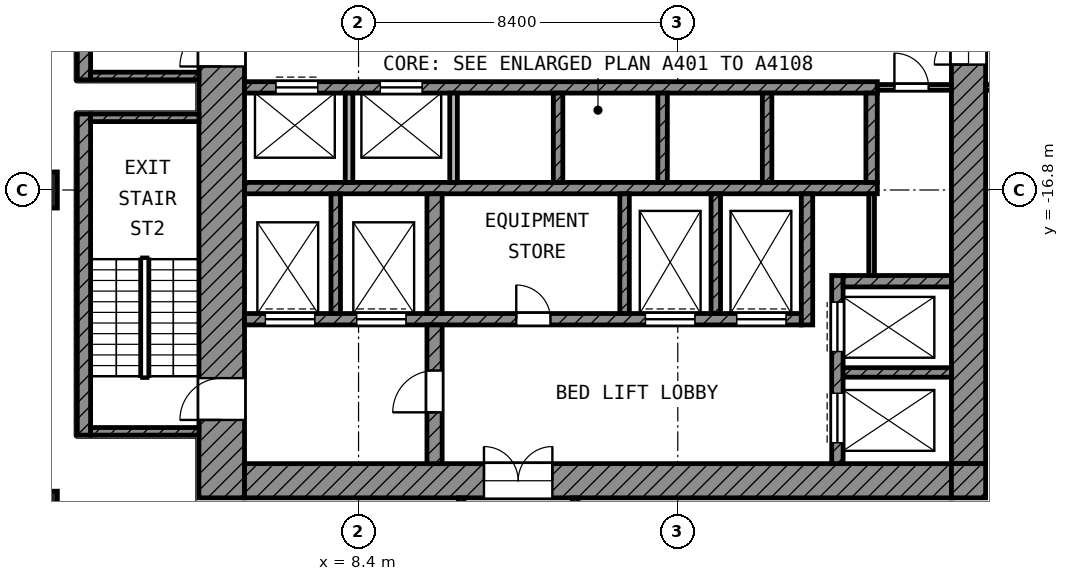
"""IFC4 building model, lengths in metres.
Left out: names, types, materials, properties, quantities, classifications, styles, units other than length and angle.
Written with IfcOpenShell. Run it as: python <this file> out.ifc"""

import sys

from ifc_helpers import new_model, si_unit, direction, frame, frame_2d, origin, origin_2d, place, context, subcontext, project, spatial, rectangle, extrude, element, fill, save


model = new_model("IFC4")
c1 = context("Model", 3, precision=1e-05, world=origin(), true_north=direction((0.0, 1.0)))
c2 = subcontext(c1, "Body", "Model", "MODEL_VIEW")
j1 = project(units=[si_unit("LENGTHUNIT", "METRE"), si_unit("PLANEANGLEUNIT", "RADIAN")], contexts=[c1])
p1 = place(None, origin())
s1 = spatial("IfcSite", under=j1, at=p1, CompositionType="ELEMENT")
p2 = place(p1, origin())
s2 = spatial("IfcBuilding", under=s1, at=p2, CompositionType="ELEMENT")
p3 = place(p2, frame((0.0, 0.0, 187.8)))
s3 = spatial("IfcBuildingStorey", under=s2, at=p3, CompositionType="ELEMENT", Elevation=187.8)
for number, where, z_axis, x_axis in (
    (1, (0.0, -16.8, 0.0), (0.0, 0.0, 1.0), (1.0, 0.0, 0.0)),
    (2, (0.0, -25.2, 0.0), (0.0, 0.0, 1.0), (1.0, 0.0, 0.0)),
):
    element("IfcColumn", number, at=place(p3, frame(where, z_axis=z_axis, x_axis=x_axis)), inside=s3, PredefinedType="COLUMN", context=c2, shape_type="SweptSolid", body=[
        extrude(rectangle(XDim=0.95, YDim=0.95, at=origin_2d()), origin(), (0.0, 0.0, 1.0), 4.2),
    ])
p4 = place(p3, frame((4.8, -24.9, 0.0), z_axis=(0.0, 0.0, 1.0), x_axis=(0.0, 1.0, 0.0)))
e3 = element("IfcWall", 3, at=p4, inside=s3, PredefinedType="SHEAR", context=c2, shape_type="SweptSolid", body=[
    extrude(rectangle(XDim=19.5, YDim=1.2, at=frame_2d((9.75, 0.0))), origin(), (0.0, 0.0, 1.0), 3.6),
])
p5 = place(p4, frame((11.35, 0.0, 0.0)))
e4 = element("IfcOpeningElement", 4, at=p5, cuts=e3, PredefinedType="OPENING", context=c2, shape_type="SweptSolid", body=[
    extrude(rectangle(XDim=1.1, YDim=2.1, at=frame_2d((0.55, 1.05))), frame((0.0, 0.61, 0.0), z_axis=(0.0, -1.0, 0.0), x_axis=(1.0, 0.0, 0.0)), (0.0, 0.0, 1.0), 1.22),
])
p6 = place(p4, frame((2.05, 0.0, 0.0)))
e5 = element("IfcOpeningElement", 5, at=p6, cuts=e3, PredefinedType="OPENING", context=c2, shape_type="SweptSolid", body=[
    extrude(rectangle(XDim=1.1, YDim=2.1, at=frame_2d((0.55, 1.05))), frame((0.0, 0.61, 0.0), z_axis=(0.0, -1.0, 0.0), x_axis=(1.0, 0.0, 0.0)), (0.0, 0.0, 1.0), 1.22),
])
p7 = place(p3, frame((24.45, -24.0, 0.0), z_axis=(0.0, 0.0, 1.0), x_axis=(0.0, 1.0, 0.0)))
e6 = element("IfcWall", 6, at=p7, inside=s3, PredefinedType="SHEAR", context=c2, shape_type="SweptSolid", body=[
    extrude(rectangle(XDim=18.6, YDim=0.9, at=frame_2d((9.3, 0.0))), origin(), (0.0, 0.0, 1.0), 3.6),
])
p8 = place(p7, frame((10.5, 0.0, 0.0)))
e7 = element("IfcOpeningElement", 7, at=p8, cuts=e6, PredefinedType="OPENING", context=c2, shape_type="SweptSolid", body=[
    extrude(rectangle(XDim=1.8, YDim=2.1, at=frame_2d((0.9, 1.05))), frame((0.0, 0.46, 0.0), z_axis=(0.0, -1.0, 0.0), x_axis=(1.0, 0.0, 0.0)), (0.0, 0.0, 1.0), 0.92),
])
p9 = place(p3, frame((5.4, -24.45, 0.0), z_axis=(0.0, 0.0, 1.0), x_axis=(1.0, 0.0, 0.0)))
e8 = element("IfcWall", 8, at=p9, inside=s3, PredefinedType="SHEAR", context=c2, shape_type="SweptSolid", body=[
    extrude(rectangle(XDim=18.6, YDim=0.9, at=frame_2d((9.3, 0.0))), origin(), (0.0, 0.0, 1.0), 3.6),
])
p10 = place(p9, frame((6.3, 0.0, 0.0)))
e9 = element("IfcOpeningElement", 9, at=p10, cuts=e8, PredefinedType="OPENING", context=c2, shape_type="SweptSolid", body=[
    extrude(rectangle(XDim=1.8, YDim=2.1, at=frame_2d((0.9, 1.05))), frame((0.0, 0.46, 0.0), z_axis=(0.0, -1.0, 0.0), x_axis=(1.0, 0.0, 0.0)), (0.0, 0.0, 1.0), 0.92),
])
p11 = place(p3, frame((24.45, -24.9, 0.0), z_axis=(0.0, 0.0, 1.0), x_axis=(0.0, 1.0, 0.0)))
e10 = element("IfcWall", 10, at=p11, inside=s3, PredefinedType="SHEAR", context=c2, shape_type="SweptSolid", body=[
    extrude(rectangle(XDim=0.9, YDim=0.9, at=frame_2d((0.45, 0.0))), origin(), (0.0, 0.0, 1.0), 3.6),
])
p12 = place(p3, frame((5.4, -14.1, 0.0), z_axis=(0.0, 0.0, 1.0), x_axis=(1.0, 0.0, 0.0)))
e11 = element("IfcWall", 11, at=p12, inside=s3, PredefinedType="SHEAR", context=c2, shape_type="SweptSolid", body=[
    extrude(rectangle(XDim=16.65, YDim=0.3, at=frame_2d((8.325, 0.0))), origin(), (0.0, 0.0, 1.0), 3.6),
])
p13 = place(p12, frame((0.825, 0.0, 0.0)))
e12 = element("IfcOpeningElement", 12, at=p13, cuts=e11, PredefinedType="OPENING", context=c2, shape_type="SweptSolid", body=[
    extrude(rectangle(XDim=1.1, YDim=2.1, at=frame_2d((0.55, 1.05))), frame((0.0, 0.16, 0.0), z_axis=(0.0, -1.0, 0.0), x_axis=(1.0, 0.0, 0.0)), (0.0, 0.0, 1.0), 0.32),
])
p14 = place(p12, frame((3.575, 0.0, 0.0)))
e13 = element("IfcOpeningElement", 13, at=p14, cuts=e11, PredefinedType="OPENING", context=c2, shape_type="SweptSolid", body=[
    extrude(rectangle(XDim=1.1, YDim=2.1, at=frame_2d((0.55, 1.05))), frame((0.0, 0.16, 0.0), z_axis=(0.0, -1.0, 0.0), x_axis=(1.0, 0.0, 0.0)), (0.0, 0.0, 1.0), 0.32),
])
p15 = place(p3, frame((5.4, -16.75, 0.0), z_axis=(0.0, 0.0, 1.0), x_axis=(1.0, 0.0, 0.0)))
e14 = element("IfcWall", 14, at=p15, inside=s3, PredefinedType="SHEAR", context=c2, shape_type="SweptSolid", body=[
    extrude(rectangle(XDim=16.65, YDim=0.3, at=frame_2d((8.325, 0.0))), origin(), (0.0, 0.0, 1.0), 3.6),
])
p16 = place(p3, frame((5.4, -20.2, 0.0), z_axis=(0.0, 0.0, 1.0), x_axis=(1.0, 0.0, 0.0)))
e15 = element("IfcWall", 15, at=p16, inside=s3, PredefinedType="SHEAR", context=c2, shape_type="SweptSolid", body=[
    extrude(rectangle(XDim=14.65, YDim=0.3, at=frame_2d((7.325, 0.0))), origin(), (0.0, 0.0, 1.0), 3.6),
])
p17 = place(p16, frame((10.55, 0.0, 0.0)))
e16 = element("IfcOpeningElement", 16, at=p17, cuts=e15, PredefinedType="OPENING", context=c2, shape_type="SweptSolid", body=[
    extrude(rectangle(XDim=1.3, YDim=2.1, at=frame_2d((0.65, 1.05))), frame((0.0, 0.16, 0.0), z_axis=(0.0, -1.0, 0.0), x_axis=(1.0, 0.0, 0.0)), (0.0, 0.0, 1.0), 0.32),
])
p18 = place(p16, frame((12.95, 0.0, 0.0)))
e17 = element("IfcOpeningElement", 17, at=p18, cuts=e15, PredefinedType="OPENING", context=c2, shape_type="SweptSolid", body=[
    extrude(rectangle(XDim=1.3, YDim=2.1, at=frame_2d((0.65, 1.05))), frame((0.0, 0.16, 0.0), z_axis=(0.0, -1.0, 0.0), x_axis=(1.0, 0.0, 0.0)), (0.0, 0.0, 1.0), 0.32),
])
p19 = place(p16, frame((0.55, 0.0, 0.0)))
e18 = element("IfcOpeningElement", 18, at=p19, cuts=e15, PredefinedType="OPENING", context=c2, shape_type="SweptSolid", body=[
    extrude(rectangle(XDim=1.3, YDim=2.1, at=frame_2d((0.65, 1.05))), frame((0.0, 0.16, 0.0), z_axis=(0.0, -1.0, 0.0), x_axis=(1.0, 0.0, 0.0)), (0.0, 0.0, 1.0), 0.32),
])
p20 = place(p16, frame((2.95, 0.0, 0.0)))
e19 = element("IfcOpeningElement", 19, at=p20, cuts=e15, PredefinedType="OPENING", context=c2, shape_type="SweptSolid", body=[
    extrude(rectangle(XDim=1.3, YDim=2.1, at=frame_2d((0.65, 1.05))), frame((0.0, 0.16, 0.0), z_axis=(0.0, -1.0, 0.0), x_axis=(1.0, 0.0, 0.0)), (0.0, 0.0, 1.0), 0.32),
])
p21 = place(p16, frame((7.15, 0.0, 0.0)))
e20 = element("IfcOpeningElement", 20, at=p21, cuts=e15, PredefinedType="OPENING", context=c2, shape_type="SweptSolid", body=[
    extrude(rectangle(XDim=0.9, YDim=2.1, at=frame_2d((0.45, 1.05))), frame((0.0, 0.16, 0.0), z_axis=(0.0, -1.0, 0.0), x_axis=(1.0, 0.0, 0.0)), (0.0, 0.0, 1.0), 0.32),
])
p22 = place(p3, frame((10.4, -24.0, 0.0), z_axis=(0.0, 0.0, 1.0), x_axis=(0.0, 1.0, 0.0)))
e21 = element("IfcWall", 21, at=p22, inside=s3, PredefinedType="SHEAR", context=c2, shape_type="SweptSolid", body=[
    extrude(rectangle(XDim=3.65, YDim=0.4, at=frame_2d((1.825, 0.0))), origin(), (0.0, 0.0, 1.0), 3.6),
])
p23 = place(p22, frame((1.35, 0.0, 0.0)))
e22 = element("IfcOpeningElement", 22, at=p23, cuts=e21, PredefinedType="OPENING", context=c2, shape_type="SweptSolid", body=[
    extrude(rectangle(XDim=1.1, YDim=2.1, at=frame_2d((0.55, 1.05))), frame((0.0, 0.21, 0.0), z_axis=(0.0, -1.0, 0.0), x_axis=(1.0, 0.0, 0.0)), (0.0, 0.0, 1.0), 0.42),
])
p24 = place(p3, frame((10.4, -20.05, 0.0), z_axis=(0.0, 0.0, 1.0), x_axis=(0.0, 1.0, 0.0)))
e23 = element("IfcWall", 23, at=p24, inside=s3, PredefinedType="SHEAR", context=c2, shape_type="SweptSolid", body=[
    extrude(rectangle(XDim=3.15, YDim=0.4, at=frame_2d((1.575, 0.0))), origin(), (0.0, 0.0, 1.0), 3.6),
])
p25 = place(p3, frame((20.2, -20.35, 0.0), z_axis=(0.0, 0.0, 1.0), x_axis=(0.0, 1.0, 0.0)))
e24 = element("IfcWall", 24, at=p25, inside=s3, PredefinedType="SHEAR", context=c2, shape_type="SweptSolid", body=[
    extrude(rectangle(XDim=3.45, YDim=0.3, at=frame_2d((1.725, 0.0))), origin(), (0.0, 0.0, 1.0), 3.6),
])
p26 = place(p3, frame((21.9, -16.6, 0.0), z_axis=(0.0, 0.0, 1.0), x_axis=(0.0, 1.0, 0.0)))
e25 = element("IfcWall", 25, at=p26, inside=s3, PredefinedType="SHEAR", context=c2, shape_type="SweptSolid", body=[
    extrude(rectangle(XDim=2.35, YDim=0.3, at=frame_2d((1.175, 0.0))), origin(), (0.0, 0.0, 1.0), 3.6),
])
p27 = place(p3, frame((21.15, -19.2, 0.0), z_axis=(0.0, 0.0, 1.0), x_axis=(1.0, 0.0, 0.0)))
e26 = element("IfcWall", 26, at=p27, inside=s3, PredefinedType="SHEAR", context=c2, shape_type="SweptSolid", body=[
    extrude(rectangle(XDim=2.85, YDim=0.3, at=frame_2d((1.425, 0.0))), origin(), (0.0, 0.0, 1.0), 3.6),
])
p28 = place(p3, frame((21.0, -24.0, 0.0), z_axis=(0.0, 0.0, 1.0), x_axis=(0.0, 1.0, 0.0)))
e27 = element("IfcWall", 27, at=p28, inside=s3, PredefinedType="SHEAR", context=c2, shape_type="SweptSolid", body=[
    extrude(rectangle(XDim=4.95, YDim=0.3, at=frame_2d((2.475, 0.0))), origin(), (0.0, 0.0, 1.0), 3.6),
])
p29 = place(p28, frame((2.95, 0.0, 0.0)))
e28 = element("IfcOpeningElement", 28, at=p29, cuts=e27, PredefinedType="OPENING", context=c2, shape_type="SweptSolid", body=[
    extrude(rectangle(XDim=1.3, YDim=2.1, at=frame_2d((0.65, 1.05))), frame((0.0, 0.16, 0.0), z_axis=(0.0, -1.0, 0.0), x_axis=(1.0, 0.0, 0.0)), (0.0, 0.0, 1.0), 0.32),
])
p30 = place(p28, frame((0.55, 0.0, 0.0)))
e29 = element("IfcOpeningElement", 29, at=p30, cuts=e27, PredefinedType="OPENING", context=c2, shape_type="SweptSolid", body=[
    extrude(rectangle(XDim=1.3, YDim=2.1, at=frame_2d((0.65, 1.05))), frame((0.0, 0.16, 0.0), z_axis=(0.0, -1.0, 0.0), x_axis=(1.0, 0.0, 0.0)), (0.0, 0.0, 1.0), 0.32),
])
p31 = place(p3, frame((21.15, -21.6, 0.0), z_axis=(0.0, 0.0, 1.0), x_axis=(1.0, 0.0, 0.0)))
e30 = element("IfcWall", 30, at=p31, inside=s3, PredefinedType="SHEAR", context=c2, shape_type="SweptSolid", body=[
    extrude(rectangle(XDim=2.85, YDim=0.25, at=frame_2d((1.425, 0.0))), origin(), (0.0, 0.0, 1.0), 3.6),
])
for number, where, z_axis, x_axis in (
    (31, (7.8, -20.05, 0.0), (0.0, 0.0, 1.0), (0.0, 1.0, 0.0)),
    (32, (15.4, -20.05, 0.0), (0.0, 0.0, 1.0), (0.0, 1.0, 0.0)),
    (33, (17.8, -20.05, 0.0), (0.0, 0.0, 1.0), (0.0, 1.0, 0.0)),
):
    element("IfcWall", number, at=place(p3, frame(where, z_axis=z_axis, x_axis=x_axis)), inside=s3, PredefinedType="SHEAR", context=c2, shape_type="SweptSolid", body=[
        extrude(rectangle(XDim=3.15, YDim=0.25, at=frame_2d((1.575, 0.0))), origin(), (0.0, 0.0, 1.0), 3.6),
    ])
for number, where, z_axis, x_axis in (
    (34, (8.15, -16.6, 0.0), (0.0, 0.0, 1.0), (0.0, 1.0, 0.0)),
    (35, (10.9, -16.6, 0.0), (0.0, 0.0, 1.0), (0.0, 1.0, 0.0)),
):
    element("IfcWall", number, at=place(p3, frame(where, z_axis=z_axis, x_axis=x_axis)), inside=s3, PredefinedType="PARTITIONING", context=c2, shape_type="SweptSolid", body=[
        extrude(rectangle(XDim=2.35, YDim=0.2, at=frame_2d((1.175, 0.0))), origin(), (0.0, 0.0, 1.0), 3.6),
    ])
for number, where, z_axis, x_axis in (
    (36, (13.65, -16.6, 0.0), (0.0, 0.0, 1.0), (0.0, 1.0, 0.0)),
    (37, (16.4, -16.6, 0.0), (0.0, 0.0, 1.0), (0.0, 1.0, 0.0)),
    (38, (19.15, -16.6, 0.0), (0.0, 0.0, 1.0), (0.0, 1.0, 0.0)),
):
    element("IfcWall", number, at=place(p3, frame(where, z_axis=z_axis, x_axis=x_axis)), inside=s3, PredefinedType="SHEAR", context=c2, shape_type="SweptSolid", body=[
        extrude(rectangle(XDim=2.35, YDim=0.25, at=frame_2d((1.175, 0.0))), origin(), (0.0, 0.0, 1.0), 3.6),
    ])
p32 = place(p3, frame((21.9, -19.05, 0.0), z_axis=(0.0, 0.0, 1.0), x_axis=(0.0, 1.0, 0.0)))
e39 = element("IfcWall", 39, at=p32, inside=s3, PredefinedType="PARTITIONING", context=c2, shape_type="SweptSolid", body=[
    extrude(rectangle(XDim=2.15, YDim=0.15, at=frame_2d((1.075, 0.0))), origin(), (0.0, 0.0, 1.0), 3.6),
])
p33 = place(p3, frame((22.05, -14.1, 0.0), z_axis=(0.0, 0.0, 1.0), x_axis=(1.0, 0.0, 0.0)))
e40 = element("IfcWall", 40, at=p33, inside=s3, PredefinedType="PARTITIONING", context=c2, shape_type="SweptSolid", body=[
    extrude(rectangle(XDim=1.95, YDim=0.15, at=frame_2d((0.975, 0.0))), origin(), (0.0, 0.0, 1.0), 3.6),
])
p34 = place(p33, frame((0.45, 0.0, 0.0)))
e41 = element("IfcOpeningElement", 41, at=p34, cuts=e40, PredefinedType="OPENING", context=c2, shape_type="SweptSolid", body=[
    extrude(rectangle(XDim=0.9, YDim=2.1, at=frame_2d((0.45, 1.05))), frame((0.0, 0.085, 0.0), z_axis=(0.0, -1.0, 0.0), x_axis=(1.0, 0.0, 0.0)), (0.0, 0.0, 1.0), 0.17),
])
p35 = place(p3, frame((1.175, -13.9, 0.0), z_axis=(0.0, 0.0, 1.0), x_axis=(0.0, 1.0, 0.0)))
e42 = element("IfcWall", 42, at=p35, inside=s3, PredefinedType="SHEAR", context=c2, shape_type="SweptSolid", body=[
    extrude(rectangle(XDim=8.45, YDim=0.35, at=frame_2d((4.225, 0.0))), origin(), (0.0, 0.0, 1.0), 3.6),
])
p36 = place(p3, frame((1.35, -13.8, 0.0), z_axis=(0.0, 0.0, 1.0), x_axis=(1.0, 0.0, 0.0)))
e43 = element("IfcWall", 43, at=p36, inside=s3, PredefinedType="SHEAR", context=c2, shape_type="SweptSolid", body=[
    extrude(rectangle(XDim=2.85, YDim=0.2, at=frame_2d((1.425, 0.0))), origin(), (0.0, 0.0, 1.0), 3.6),
])
p37 = place(p3, frame((1.175, -23.25, 0.0), z_axis=(0.0, 0.0, 1.0), x_axis=(0.0, 1.0, 0.0)))
e44 = element("IfcWall", 44, at=p37, inside=s3, PredefinedType="SHEAR", context=c2, shape_type="SweptSolid", body=[
    extrude(rectangle(XDim=8.45, YDim=0.35, at=frame_2d((4.225, 0.0))), origin(), (0.0, 0.0, 1.0), 3.6),
])
for number, where, z_axis, x_axis in (
    (45, (1.35, -14.9, 0.0), (0.0, 0.0, 1.0), (1.0, 0.0, 0.0)),
    (46, (1.35, -23.15, 0.0), (0.0, 0.0, 1.0), (1.0, 0.0, 0.0)),
):
    element("IfcWall", number, at=place(p3, frame(where, z_axis=z_axis, x_axis=x_axis)), inside=s3, PredefinedType="SHEAR", context=c2, shape_type="SweptSolid", body=[
        extrude(rectangle(XDim=2.85, YDim=0.2, at=frame_2d((1.425, 0.0))), origin(), (0.0, 0.0, 1.0), 3.6),
    ])
p38 = place(p3, frame((24.9, -14.1, 0.0), z_axis=(0.0, 0.0, 1.0), x_axis=(1.0, 0.0, 0.0)))
e47 = element("IfcWall", 47, at=p38, inside=s3, PredefinedType="PARTITIONING", context=c2, shape_type="SweptSolid", body=[
    extrude(rectangle(XDim=4.425, YDim=0.15, at=frame_2d((2.212, 0.0))), origin(), (0.0, 0.0, 1.0), 3.6),
])
p39 = place(p38, frame((1.65, 0.0, 0.0)))
e48 = element("IfcOpeningElement", 48, at=p39, cuts=e47, PredefinedType="OPENING", context=c2, shape_type="SweptSolid", body=[
    extrude(rectangle(XDim=1.5, YDim=2.1, at=frame_2d((0.75, 1.05))), frame((0.0, 0.085, 0.0), z_axis=(0.0, -1.0, 0.0), x_axis=(1.0, 0.0, 0.0)), (0.0, 0.0, 1.0), 0.17),
])
p40 = place(p3, frame((11.1, -29.397, 0.0), z_axis=(0.0, 0.0, 1.0), x_axis=(0.0, 1.0, 0.0)))
e49 = element("IfcWall", 49, at=p40, inside=s3, PredefinedType="PARTITIONING", context=c2, shape_type="SweptSolid", body=[
    extrude(rectangle(XDim=4.497, YDim=0.15, at=frame_2d((2.249, 0.0))), origin(), (0.0, 0.0, 1.0), 3.6),
])
p41 = place(p3, frame((14.1, -29.4, 0.0), z_axis=(0.0, 0.0, 1.0), x_axis=(0.0, 1.0, 0.0)))
e50 = element("IfcWall", 50, at=p41, inside=s3, PredefinedType="PARTITIONING", context=c2, shape_type="SweptSolid", body=[
    extrude(rectangle(XDim=4.5, YDim=0.15, at=frame_2d((2.25, 0.0))), origin(), (0.0, 0.0, 1.0), 3.6),
])
p42 = place(p13, origin())
e51 = element("IfcDoor", 51, at=p42, inside=s3, OperationType="DOUBLE_DOOR_SLIDING", PredefinedType="DOOR", context=c2, shape_type="SweptSolid", body=[
    extrude(rectangle(XDim=1.1, YDim=2.1, at=frame_2d((0.55, 1.05))), frame((0.0, 0.025, 0.0), z_axis=(0.0, -1.0, 0.0), x_axis=(1.0, 0.0, 0.0)), (0.0, 0.0, 1.0), 0.05),
])
fill(e12, e51)
p43 = place(p14, origin())
e52 = element("IfcDoor", 52, at=p43, inside=s3, OperationType="DOUBLE_DOOR_SLIDING", PredefinedType="DOOR", context=c2, shape_type="SweptSolid", body=[
    extrude(rectangle(XDim=1.1, YDim=2.1, at=frame_2d((0.55, 1.05))), frame((0.0, 0.025, 0.0), z_axis=(0.0, -1.0, 0.0), x_axis=(1.0, 0.0, 0.0)), (0.0, 0.0, 1.0), 0.05),
])
fill(e13, e52)
p44 = place(p29, origin())
e53 = element("IfcDoor", 53, at=p44, inside=s3, OperationType="DOUBLE_DOOR_SLIDING", PredefinedType="DOOR", context=c2, shape_type="SweptSolid", body=[
    extrude(rectangle(XDim=1.3, YDim=2.1, at=frame_2d((0.65, 1.05))), frame((0.0, 0.025, 0.0), z_axis=(0.0, -1.0, 0.0), x_axis=(1.0, 0.0, 0.0)), (0.0, 0.0, 1.0), 0.05),
])
fill(e28, e53)
p45 = place(p30, origin())
e54 = element("IfcDoor", 54, at=p45, inside=s3, OperationType="DOUBLE_DOOR_SLIDING", PredefinedType="DOOR", context=c2, shape_type="SweptSolid", body=[
    extrude(rectangle(XDim=1.3, YDim=2.1, at=frame_2d((0.65, 1.05))), frame((0.0, 0.025, 0.0), z_axis=(0.0, -1.0, 0.0), x_axis=(1.0, 0.0, 0.0)), (0.0, 0.0, 1.0), 0.05),
])
fill(e29, e54)
p46 = place(p17, origin())
e55 = element("IfcDoor", 55, at=p46, inside=s3, OperationType="DOUBLE_DOOR_SLIDING", PredefinedType="DOOR", context=c2, shape_type="SweptSolid", body=[
    extrude(rectangle(XDim=1.3, YDim=2.1, at=frame_2d((0.65, 1.05))), frame((0.0, 0.025, 0.0), z_axis=(0.0, -1.0, 0.0), x_axis=(1.0, 0.0, 0.0)), (0.0, 0.0, 1.0), 0.05),
])
fill(e16, e55)
p47 = place(p18, origin())
e56 = element("IfcDoor", 56, at=p47, inside=s3, OperationType="DOUBLE_DOOR_SLIDING", PredefinedType="DOOR", context=c2, shape_type="SweptSolid", body=[
    extrude(rectangle(XDim=1.3, YDim=2.1, at=frame_2d((0.65, 1.05))), frame((0.0, 0.025, 0.0), z_axis=(0.0, -1.0, 0.0), x_axis=(1.0, 0.0, 0.0)), (0.0, 0.0, 1.0), 0.05),
])
fill(e17, e56)
p48 = place(p19, origin())
e57 = element("IfcDoor", 57, at=p48, inside=s3, OperationType="DOUBLE_DOOR_SLIDING", PredefinedType="DOOR", context=c2, shape_type="SweptSolid", body=[
    extrude(rectangle(XDim=1.3, YDim=2.1, at=frame_2d((0.65, 1.05))), frame((0.0, 0.025, 0.0), z_axis=(0.0, -1.0, 0.0), x_axis=(1.0, 0.0, 0.0)), (0.0, 0.0, 1.0), 0.05),
])
fill(e18, e57)
p49 = place(p20, origin())
e58 = element("IfcDoor", 58, at=p49, inside=s3, OperationType="DOUBLE_DOOR_SLIDING", PredefinedType="DOOR", context=c2, shape_type="SweptSolid", body=[
    extrude(rectangle(XDim=1.3, YDim=2.1, at=frame_2d((0.65, 1.05))), frame((0.0, 0.025, 0.0), z_axis=(0.0, -1.0, 0.0), x_axis=(1.0, 0.0, 0.0)), (0.0, 0.0, 1.0), 0.05),
])
fill(e19, e58)
p50 = place(p5, origin())
e59 = element("IfcDoor", 59, at=p50, inside=s3, OperationType="SINGLE_SWING_LEFT", PredefinedType="DOOR", context=c2, shape_type="SweptSolid", body=[
    extrude(rectangle(XDim=1.1, YDim=2.1, at=frame_2d((0.55, 1.05))), frame((0.0, 0.025, 0.0), z_axis=(0.0, -1.0, 0.0), x_axis=(1.0, 0.0, 0.0)), (0.0, 0.0, 1.0), 0.05),
])
fill(e4, e59)
p51 = place(p6, origin())
e60 = element("IfcDoor", 60, at=p51, inside=s3, OperationType="SINGLE_SWING_LEFT", PredefinedType="DOOR", context=c2, shape_type="SweptSolid", body=[
    extrude(rectangle(XDim=1.1, YDim=2.1, at=frame_2d((0.55, 1.05))), frame((0.0, 0.025, 0.0), z_axis=(0.0, -1.0, 0.0), x_axis=(1.0, 0.0, 0.0)), (0.0, 0.0, 1.0), 0.05),
])
fill(e5, e60)
p52 = place(p23, origin())
e61 = element("IfcDoor", 61, at=p52, inside=s3, OperationType="SINGLE_SWING_LEFT", PredefinedType="DOOR", context=c2, shape_type="SweptSolid", body=[
    extrude(rectangle(XDim=1.1, YDim=2.1, at=frame_2d((0.55, 1.05))), frame((0.0, 0.025, 0.0), z_axis=(0.0, -1.0, 0.0), x_axis=(1.0, 0.0, 0.0)), (0.0, 0.0, 1.0), 0.05),
])
fill(e22, e61)
p53 = place(p8, origin())
e62 = element("IfcDoor", 62, at=p53, inside=s3, OperationType="DOUBLE_DOOR_SINGLE_SWING", PredefinedType="DOOR", context=c2, shape_type="SweptSolid", body=[
    extrude(rectangle(XDim=1.8, YDim=2.1, at=frame_2d((0.9, 1.05))), frame((0.0, 0.025, 0.0), z_axis=(0.0, -1.0, 0.0), x_axis=(1.0, 0.0, 0.0)), (0.0, 0.0, 1.0), 0.05),
])
fill(e7, e62)
p54 = place(p10, origin())
e63 = element("IfcDoor", 63, at=p54, inside=s3, OperationType="DOUBLE_DOOR_SINGLE_SWING", PredefinedType="DOOR", context=c2, shape_type="SweptSolid", body=[
    extrude(rectangle(XDim=1.8, YDim=2.1, at=frame_2d((0.9, 1.05))), frame((0.0, 0.025, 0.0), z_axis=(0.0, -1.0, 0.0), x_axis=(1.0, 0.0, 0.0)), (0.0, 0.0, 1.0), 0.05),
])
fill(e9, e63)
p55 = place(p34, origin())
e64 = element("IfcDoor", 64, at=p55, inside=s3, OperationType="SINGLE_SWING_LEFT", PredefinedType="DOOR", context=c2, shape_type="SweptSolid", body=[
    extrude(rectangle(XDim=0.9, YDim=2.1, at=frame_2d((0.45, 1.05))), frame((0.0, 0.025, 0.0), z_axis=(0.0, -1.0, 0.0), x_axis=(1.0, 0.0, 0.0)), (0.0, 0.0, 1.0), 0.05),
])
fill(e41, e64)
p56 = place(p21, origin())
e65 = element("IfcDoor", 65, at=p56, inside=s3, OperationType="SINGLE_SWING_LEFT", PredefinedType="DOOR", context=c2, shape_type="SweptSolid", body=[
    extrude(rectangle(XDim=0.9, YDim=2.1, at=frame_2d((0.45, 1.05))), frame((0.0, 0.025, 0.0), z_axis=(0.0, -1.0, 0.0), x_axis=(1.0, 0.0, 0.0)), (0.0, 0.0, 1.0), 0.05),
])
fill(e20, e65)
save(model, sys.argv[1])
